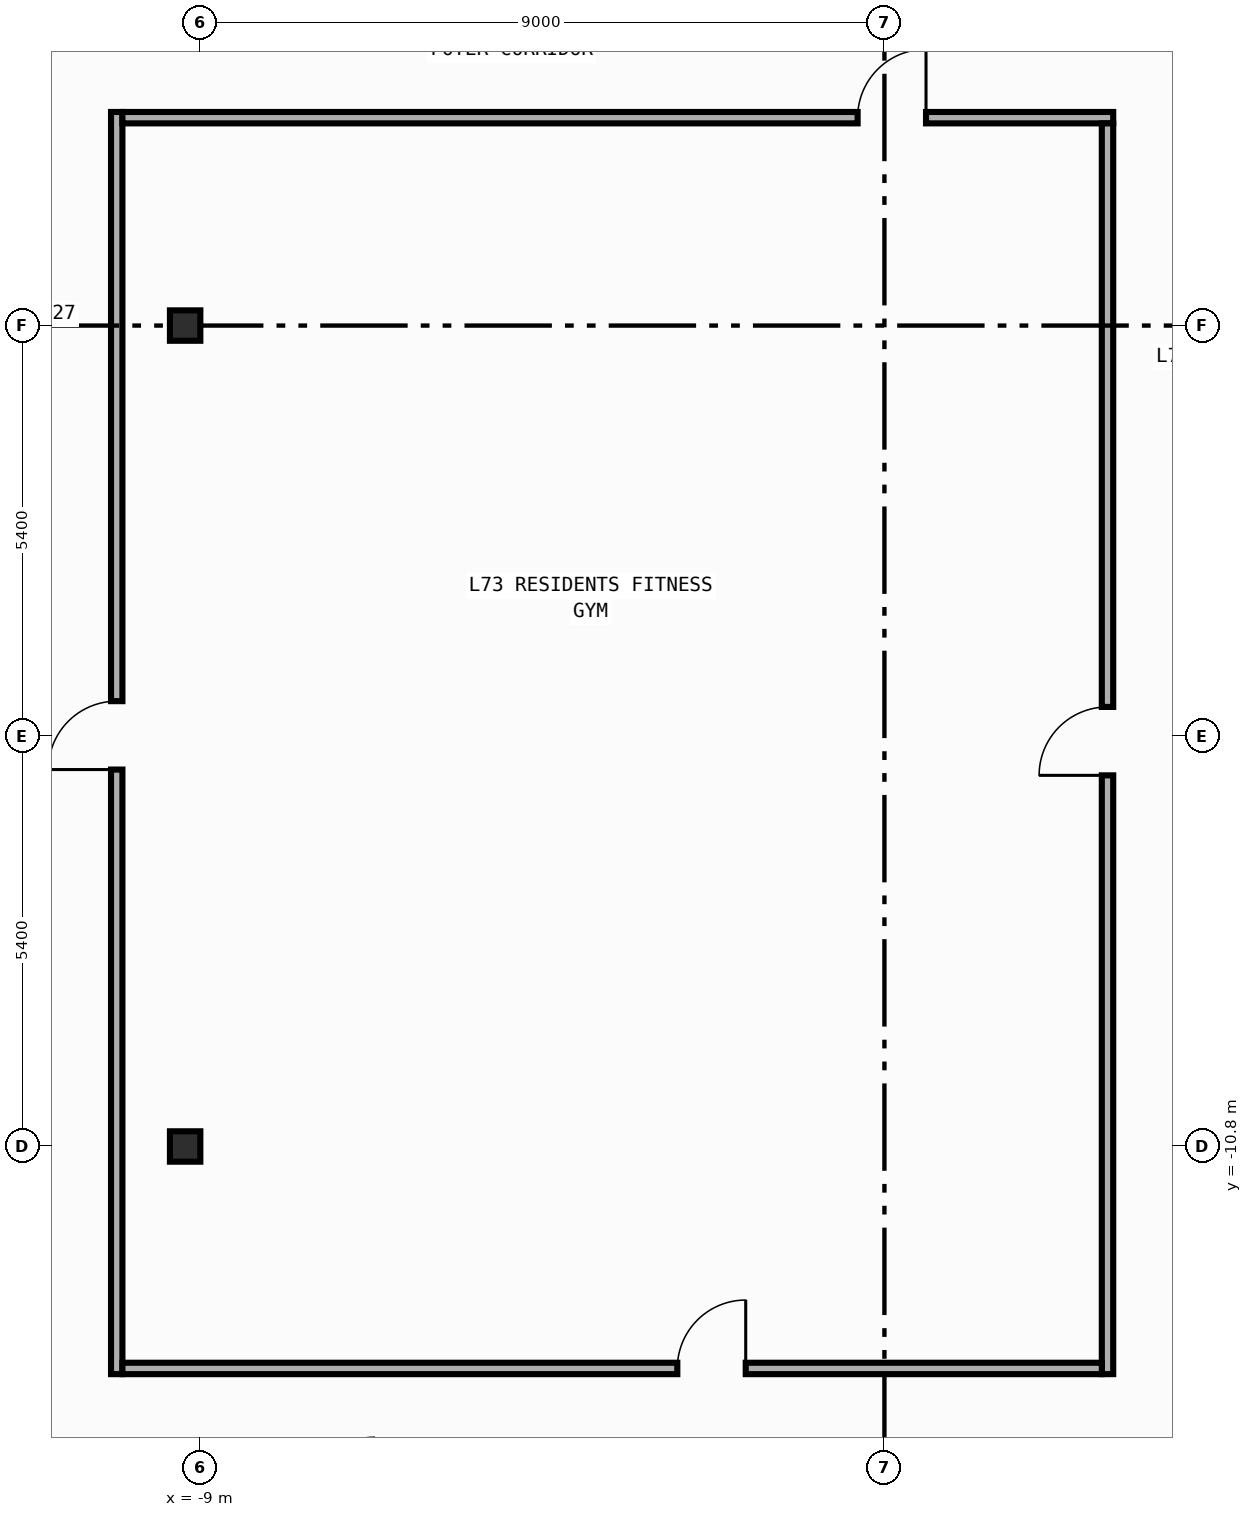
"""IFC4 building model, lengths in metres.
Left out: names, types, materials, properties, quantities, classifications, styles, units other than length and angle.
Written with IfcOpenShell. Run it as: python <this file> out.ifc"""

import sys

from ifc_helpers import new_model, si_unit, direction, frame, frame_2d, origin, origin_2d, place, context, subcontext, project, spatial, rectangle, i_section, extrude, element, fill, save


model = new_model("IFC4")
c1 = context("Model", 3, precision=1e-05, world=origin(), true_north=direction((0.0, 1.0)))
c2 = subcontext(c1, "Body", "Model", "MODEL_VIEW")
j1 = project(units=[si_unit("LENGTHUNIT", "METRE"), si_unit("PLANEANGLEUNIT", "RADIAN")], contexts=[c1])
p1 = place(None, origin())
s1 = spatial("IfcSite", under=j1, at=p1, CompositionType="ELEMENT")
p2 = place(p1, origin())
s2 = spatial("IfcBuilding", under=s1, at=p2, CompositionType="ELEMENT")
p3 = place(p2, frame((0.0, 0.0, 304.2)))
s3 = spatial("IfcBuildingStorey", under=s2, at=p3, CompositionType="ELEMENT", Elevation=304.2)
for number, where, z_axis, x_axis in (
    (1, (-9.2, -10.8, 0.0), (0.0, 0.0, 1.0), (1.0, 0.0, 0.0)),
    (2, (-9.2, 0.0, 0.0), (0.0, 0.0, 1.0), (1.0, 0.0, 0.0)),
):
    element("IfcColumn", number, at=place(p3, frame(where, z_axis=z_axis, x_axis=x_axis)), inside=s3, PredefinedType="COLUMN", context=c2, shape_type="SweptSolid", body=[
        extrude(i_section(OverallWidth=0.4, OverallDepth=0.4, WebThickness=0.013, FlangeThickness=0.021, FilletRadius=0.022, at=origin_2d()), origin(), (0.0, 0.0, 1.0), 3.8),
    ])
p4 = place(p3, frame((-10.1, -13.795, 0.0), z_axis=(0.0, 0.0, 1.0), x_axis=(0.0, 1.0, 0.0)))
e3 = element("IfcWall", 3, at=p4, inside=s3, PredefinedType="PARTITIONING", context=c2, shape_type="SweptSolid", body=[
    extrude(rectangle(XDim=16.605, YDim=0.15, at=frame_2d((8.302, 0.0))), origin(), (0.0, 0.0, 1.0), 3.54),
])
p5 = place(p4, frame((7.954, 0.0, 0.0)))
e4 = element("IfcOpeningElement", 4, at=p5, cuts=e3, PredefinedType="OPENING", context=c2, shape_type="SweptSolid", body=[
    extrude(rectangle(XDim=0.9, YDim=2.15, at=frame_2d((0.45, 1.075))), frame((0.0, 0.085, 0.0), z_axis=(0.0, -1.0, 0.0), x_axis=(1.0, 0.0, 0.0)), (0.0, 0.0, 1.0), 0.17),
])
p6 = place(p3, frame((-10.025, 2.735, 0.0), z_axis=(0.0, 0.0, 1.0), x_axis=(1.0, 0.0, 0.0)))
e5 = element("IfcWall", 5, at=p6, inside=s3, PredefinedType="PARTITIONING", context=c2, shape_type="SweptSolid", body=[
    extrude(rectangle(XDim=13.035, YDim=0.15, at=frame_2d((6.518, 0.0))), origin(), (0.0, 0.0, 1.0), 3.54),
])
p7 = place(p6, frame((9.672, 0.0, 0.0)))
e6 = element("IfcOpeningElement", 6, at=p7, cuts=e5, PredefinedType="OPENING", context=c2, shape_type="SweptSolid", body=[
    extrude(rectangle(XDim=0.9, YDim=2.15, at=frame_2d((0.45, 1.075))), frame((0.0, 0.085, 0.0), z_axis=(0.0, -1.0, 0.0), x_axis=(1.0, 0.0, 0.0)), (0.0, 0.0, 1.0), 0.17),
])
p8 = place(p3, frame((2.935, -13.795, 0.0), z_axis=(0.0, 0.0, 1.0), x_axis=(0.0, 1.0, 0.0)))
e7 = element("IfcWall", 7, at=p8, inside=s3, PredefinedType="PARTITIONING", context=c2, shape_type="SweptSolid", body=[
    extrude(rectangle(XDim=16.455, YDim=0.15, at=frame_2d((8.228, 0.0))), origin(), (0.0, 0.0, 1.0), 3.54),
])
p9 = place(p8, frame((7.878, 0.0, 0.0)))
e8 = element("IfcOpeningElement", 8, at=p9, cuts=e7, PredefinedType="OPENING", context=c2, shape_type="SweptSolid", body=[
    extrude(rectangle(XDim=0.9, YDim=2.15, at=frame_2d((0.45, 1.075))), frame((0.0, 0.085, 0.0), z_axis=(0.0, -1.0, 0.0), x_axis=(1.0, 0.0, 0.0)), (0.0, 0.0, 1.0), 0.17),
])
p10 = place(p3, frame((-10.025, -13.72, 0.0), z_axis=(0.0, 0.0, 1.0), x_axis=(1.0, 0.0, 0.0)))
e9 = element("IfcWall", 9, at=p10, inside=s3, PredefinedType="PARTITIONING", context=c2, shape_type="SweptSolid", body=[
    extrude(rectangle(XDim=12.885, YDim=0.15, at=frame_2d((6.442, 0.0))), origin(), (0.0, 0.0, 1.0), 3.54),
])
p11 = place(p10, frame((7.3, 0.0, 0.0)))
e10 = element("IfcOpeningElement", 10, at=p11, cuts=e9, PredefinedType="OPENING", context=c2, shape_type="SweptSolid", body=[
    extrude(rectangle(XDim=0.9, YDim=2.15, at=frame_2d((0.45, 1.075))), frame((0.0, 0.085, 0.0), z_axis=(0.0, -1.0, 0.0), x_axis=(1.0, 0.0, 0.0)), (0.0, 0.0, 1.0), 0.17),
])
p12 = place(p5, origin())
e11 = element("IfcDoor", 11, at=p12, inside=s3, OperationType="SINGLE_SWING_LEFT", PredefinedType="DOOR", context=c2, shape_type="SweptSolid", body=[
    extrude(rectangle(XDim=0.9, YDim=2.15, at=frame_2d((0.45, 1.075))), frame((0.0, 0.025, 0.0), z_axis=(0.0, -1.0, 0.0), x_axis=(1.0, 0.0, 0.0)), (0.0, 0.0, 1.0), 0.05),
])
fill(e4, e11)
p13 = place(p7, origin())
e12 = element("IfcDoor", 12, at=p13, inside=s3, OperationType="SINGLE_SWING_RIGHT", PredefinedType="DOOR", context=c2, shape_type="SweptSolid", body=[
    extrude(rectangle(XDim=0.9, YDim=2.15, at=frame_2d((0.45, 1.075))), frame((0.0, 0.025, 0.0), z_axis=(0.0, -1.0, 0.0), x_axis=(1.0, 0.0, 0.0)), (0.0, 0.0, 1.0), 0.05),
])
fill(e6, e12)
p14 = place(p9, origin())
e13 = element("IfcDoor", 13, at=p14, inside=s3, OperationType="SINGLE_SWING_LEFT", PredefinedType="DOOR", context=c2, shape_type="SweptSolid", body=[
    extrude(rectangle(XDim=0.9, YDim=2.15, at=frame_2d((0.45, 1.075))), frame((0.0, 0.025, 0.0), z_axis=(0.0, -1.0, 0.0), x_axis=(1.0, 0.0, 0.0)), (0.0, 0.0, 1.0), 0.05),
])
fill(e8, e13)
p15 = place(p11, origin())
e14 = element("IfcDoor", 14, at=p15, inside=s3, OperationType="SINGLE_SWING_RIGHT", PredefinedType="DOOR", context=c2, shape_type="SweptSolid", body=[
    extrude(rectangle(XDim=0.9, YDim=2.15, at=frame_2d((0.45, 1.075))), frame((0.0, 0.025, 0.0), z_axis=(0.0, -1.0, 0.0), x_axis=(1.0, 0.0, 0.0)), (0.0, 0.0, 1.0), 0.05),
])
fill(e10, e14)
save(model, sys.argv[1])
